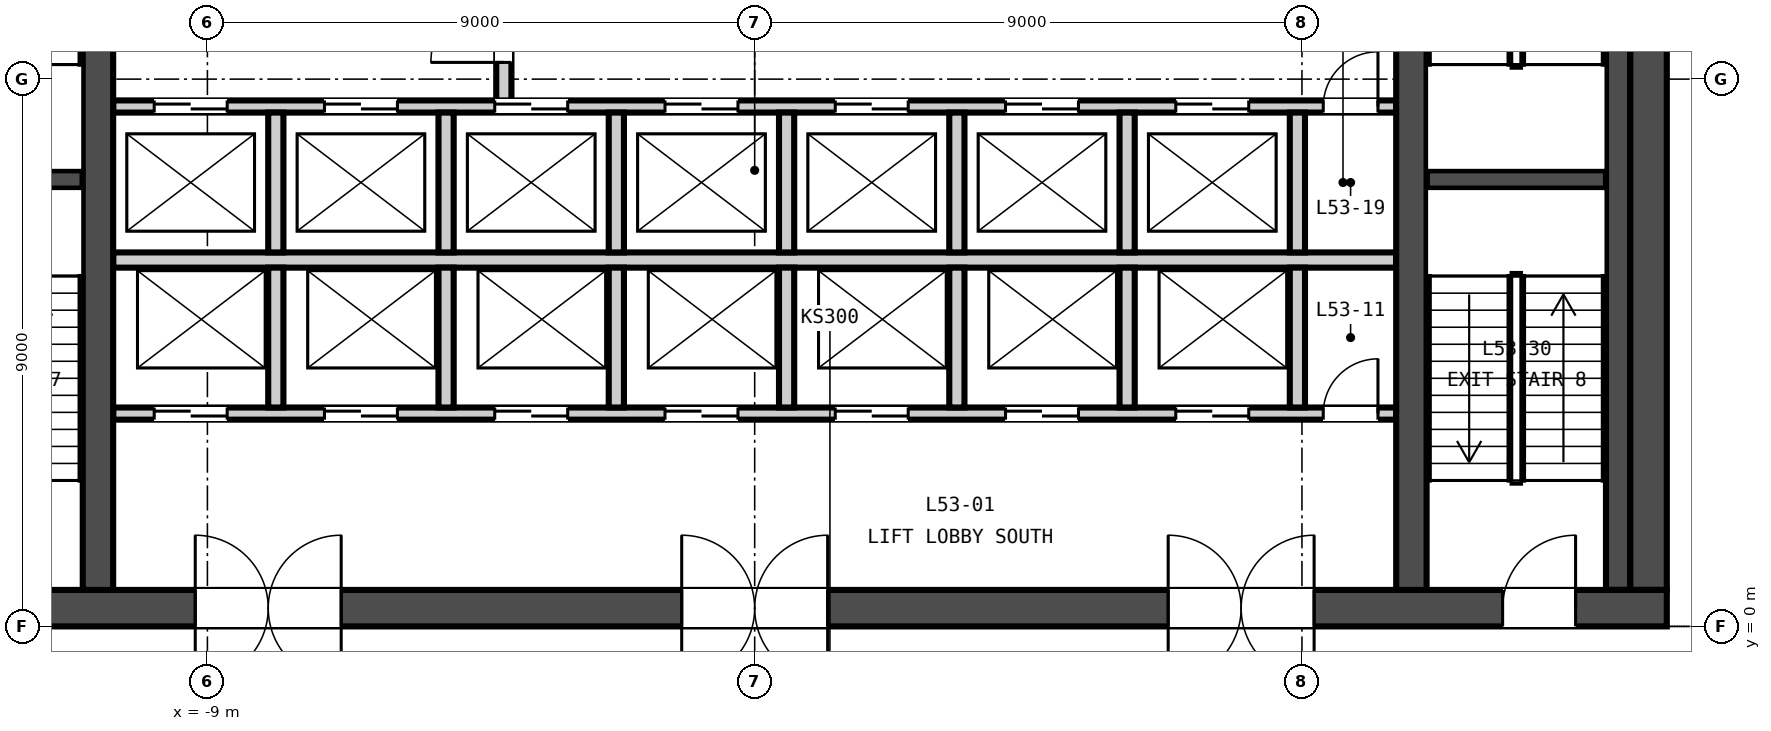
"""IFC4 building model, lengths in metres.
Left out: names, types, materials, properties, quantities, classifications, styles, units other than length and angle.
Written with IfcOpenShell. Run it as: python <this file> out.ifc"""

import sys

from ifc_helpers import new_model, si_unit, direction, frame, frame_2d, origin, place, context, subcontext, project, spatial, rectangle, extrude, element, fill, save


model = new_model("IFC4")
c1 = context("Model", 3, precision=1e-05, world=origin(), true_north=direction((0.0, 1.0)))
c2 = subcontext(c1, "Body", "Model", "MODEL_VIEW")
j1 = project(units=[si_unit("LENGTHUNIT", "METRE"), si_unit("PLANEANGLEUNIT", "RADIAN")], contexts=[c1])
p1 = place(None, origin())
s1 = spatial("IfcSite", under=j1, at=p1, CompositionType="ELEMENT")
p2 = place(p1, origin())
s2 = spatial("IfcBuilding", under=s1, at=p2, CompositionType="ELEMENT")
p3 = place(p2, frame((0.0, 0.0, 211.8)))
s3 = spatial("IfcBuildingStorey", under=s2, at=p3, CompositionType="ELEMENT", Elevation=211.8)
p4 = place(p3, frame((-15.0, 0.3, -0.3), z_axis=(0.0, 0.0, 1.0), x_axis=(1.0, 0.0, 0.0)))
e1 = element("IfcWall", 1, at=p4, inside=s3, PredefinedType="SOLIDWALL", context=c2, shape_type="SweptSolid", body=[
    extrude(rectangle(XDim=30.0, YDim=0.6, at=frame_2d((15.0, 0.0))), origin(), (0.0, 0.0, 1.0), 4.65),
])
p5 = place(p4, frame((5.8, 0.0, 0.3)))
e2 = element("IfcOpeningElement", 2, at=p5, cuts=e1, PredefinedType="OPENING", context=c2, shape_type="SweptSolid", body=[
    extrude(rectangle(XDim=2.4, YDim=2.4, at=frame_2d((1.2, 1.2))), frame((0.0, 0.31, 0.0), z_axis=(0.0, -1.0, 0.0), x_axis=(1.0, 0.0, 0.0)), (0.0, 0.0, 1.0), 0.62),
])
p6 = place(p4, frame((13.8, 0.0, 0.3)))
e3 = element("IfcOpeningElement", 3, at=p6, cuts=e1, PredefinedType="OPENING", context=c2, shape_type="SweptSolid", body=[
    extrude(rectangle(XDim=2.4, YDim=2.4, at=frame_2d((1.2, 1.2))), frame((0.0, 0.31, 0.0), z_axis=(0.0, -1.0, 0.0), x_axis=(1.0, 0.0, 0.0)), (0.0, 0.0, 1.0), 0.62),
])
p7 = place(p4, frame((21.8, 0.0, 0.3)))
e4 = element("IfcOpeningElement", 4, at=p7, cuts=e1, PredefinedType="OPENING", context=c2, shape_type="SweptSolid", body=[
    extrude(rectangle(XDim=2.4, YDim=2.4, at=frame_2d((1.2, 1.2))), frame((0.0, 0.31, 0.0), z_axis=(0.0, -1.0, 0.0), x_axis=(1.0, 0.0, 0.0)), (0.0, 0.0, 1.0), 0.62),
])
p8 = place(p4, frame((1.5, 0.0, 0.3)))
e5 = element("IfcOpeningElement", 5, at=p8, cuts=e1, PredefinedType="OPENING", context=c2, shape_type="SweptSolid", body=[
    extrude(rectangle(XDim=1.2, YDim=2.1, at=frame_2d((0.6, 1.05))), frame((0.0, 0.31, 0.0), z_axis=(0.0, -1.0, 0.0), x_axis=(1.0, 0.0, 0.0)), (0.0, 0.0, 1.0), 0.62),
])
p9 = place(p4, frame((27.3, 0.0, 0.3)))
e6 = element("IfcOpeningElement", 6, at=p9, cuts=e1, PredefinedType="OPENING", context=c2, shape_type="SweptSolid", body=[
    extrude(rectangle(XDim=1.2, YDim=2.1, at=frame_2d((0.6, 1.05))), frame((0.0, 0.31, 0.0), z_axis=(0.0, -1.0, 0.0), x_axis=(1.0, 0.0, 0.0)), (0.0, 0.0, 1.0), 0.62),
])
p10 = place(p3, frame((14.7, 0.6, -0.3), z_axis=(0.0, 0.0, 1.0), x_axis=(0.0, 1.0, 0.0)))
e7 = element("IfcWall", 7, at=p10, inside=s3, PredefinedType="SOLIDWALL", context=c2, shape_type="SweptSolid", body=[
    extrude(rectangle(XDim=13.8, YDim=0.6, at=frame_2d((6.9, 0.0))), origin(), (0.0, 0.0, 1.0), 4.65),
])
for number, where, z_axis, x_axis in (
    (8, (-10.8, 0.6, -0.3), (0.0, 0.0, 1.0), (0.0, 1.0, 0.0)),
    (9, (10.8, 0.6, -0.3), (0.0, 0.0, 1.0), (0.0, 1.0, 0.0)),
):
    element("IfcWall", number, at=place(p3, frame(where, z_axis=z_axis, x_axis=x_axis)), inside=s3, PredefinedType="SOLIDWALL", context=c2, shape_type="SweptSolid", body=[
        extrude(rectangle(XDim=13.8, YDim=0.5, at=frame_2d((6.9, 0.0))), origin(), (0.0, 0.0, 1.0), 4.65),
    ])
p11 = place(p3, frame((-10.55, 3.5, 0.0), z_axis=(0.0, 0.0, 1.0), x_axis=(1.0, 0.0, 0.0)))
e10 = element("IfcWall", 10, at=p11, inside=s3, PredefinedType="PARTITIONING", context=c2, shape_type="SweptSolid", body=[
    extrude(rectangle(XDim=21.1, YDim=0.2, at=frame_2d((10.55, 0.0))), origin(), (0.0, 0.0, 1.0), 4.35),
])
p12 = place(p11, frame((0.675, 0.0, 0.0)))
e11 = element("IfcOpeningElement", 11, at=p12, cuts=e10, PredefinedType="OPENING", context=c2, shape_type="SweptSolid", body=[
    extrude(rectangle(XDim=1.2, YDim=2.1, at=frame_2d((0.6, 1.05))), frame((0.0, 0.11, 0.0), z_axis=(0.0, -1.0, 0.0), x_axis=(1.0, 0.0, 0.0)), (0.0, 0.0, 1.0), 0.22),
])
p13 = place(p11, frame((3.475, 0.0, 0.0)))
e12 = element("IfcOpeningElement", 12, at=p13, cuts=e10, PredefinedType="OPENING", context=c2, shape_type="SweptSolid", body=[
    extrude(rectangle(XDim=1.2, YDim=2.1, at=frame_2d((0.6, 1.05))), frame((0.0, 0.11, 0.0), z_axis=(0.0, -1.0, 0.0), x_axis=(1.0, 0.0, 0.0)), (0.0, 0.0, 1.0), 0.22),
])
p14 = place(p11, frame((6.275, 0.0, 0.0)))
e13 = element("IfcOpeningElement", 13, at=p14, cuts=e10, PredefinedType="OPENING", context=c2, shape_type="SweptSolid", body=[
    extrude(rectangle(XDim=1.2, YDim=2.1, at=frame_2d((0.6, 1.05))), frame((0.0, 0.11, 0.0), z_axis=(0.0, -1.0, 0.0), x_axis=(1.0, 0.0, 0.0)), (0.0, 0.0, 1.0), 0.22),
])
p15 = place(p11, frame((9.075, 0.0, 0.0)))
e14 = element("IfcOpeningElement", 14, at=p15, cuts=e10, PredefinedType="OPENING", context=c2, shape_type="SweptSolid", body=[
    extrude(rectangle(XDim=1.2, YDim=2.1, at=frame_2d((0.6, 1.05))), frame((0.0, 0.11, 0.0), z_axis=(0.0, -1.0, 0.0), x_axis=(1.0, 0.0, 0.0)), (0.0, 0.0, 1.0), 0.22),
])
p16 = place(p11, frame((11.875, 0.0, 0.0)))
e15 = element("IfcOpeningElement", 15, at=p16, cuts=e10, PredefinedType="OPENING", context=c2, shape_type="SweptSolid", body=[
    extrude(rectangle(XDim=1.2, YDim=2.1, at=frame_2d((0.6, 1.05))), frame((0.0, 0.11, 0.0), z_axis=(0.0, -1.0, 0.0), x_axis=(1.0, 0.0, 0.0)), (0.0, 0.0, 1.0), 0.22),
])
p17 = place(p11, frame((14.675, 0.0, 0.0)))
e16 = element("IfcOpeningElement", 16, at=p17, cuts=e10, PredefinedType="OPENING", context=c2, shape_type="SweptSolid", body=[
    extrude(rectangle(XDim=1.2, YDim=2.1, at=frame_2d((0.6, 1.05))), frame((0.0, 0.11, 0.0), z_axis=(0.0, -1.0, 0.0), x_axis=(1.0, 0.0, 0.0)), (0.0, 0.0, 1.0), 0.22),
])
p18 = place(p11, frame((17.475, 0.0, 0.0)))
e17 = element("IfcOpeningElement", 17, at=p18, cuts=e10, PredefinedType="OPENING", context=c2, shape_type="SweptSolid", body=[
    extrude(rectangle(XDim=1.2, YDim=2.1, at=frame_2d((0.6, 1.05))), frame((0.0, 0.11, 0.0), z_axis=(0.0, -1.0, 0.0), x_axis=(1.0, 0.0, 0.0)), (0.0, 0.0, 1.0), 0.22),
])
p19 = place(p11, frame((19.9, 0.0, 0.0)))
e18 = element("IfcOpeningElement", 18, at=p19, cuts=e10, PredefinedType="OPENING", context=c2, shape_type="SweptSolid", body=[
    extrude(rectangle(XDim=0.9, YDim=2.1, at=frame_2d((0.45, 1.05))), frame((0.0, 0.11, 0.0), z_axis=(0.0, -1.0, 0.0), x_axis=(1.0, 0.0, 0.0)), (0.0, 0.0, 1.0), 0.22),
])
p20 = place(p3, frame((-10.55, 6.025, 0.0), z_axis=(0.0, 0.0, 1.0), x_axis=(1.0, 0.0, 0.0)))
e19 = element("IfcWall", 19, at=p20, inside=s3, PredefinedType="PARTITIONING", context=c2, shape_type="SweptSolid", body=[
    extrude(rectangle(XDim=21.1, YDim=0.25, at=frame_2d((10.55, 0.0))), origin(), (0.0, 0.0, 1.0), 4.35),
])
p21 = place(p3, frame((-10.55, 8.55, 0.0), z_axis=(0.0, 0.0, 1.0), x_axis=(1.0, 0.0, 0.0)))
e20 = element("IfcWall", 20, at=p21, inside=s3, PredefinedType="PARTITIONING", context=c2, shape_type="SweptSolid", body=[
    extrude(rectangle(XDim=21.1, YDim=0.2, at=frame_2d((10.55, 0.0))), origin(), (0.0, 0.0, 1.0), 4.35),
])
p22 = place(p21, frame((0.675, 0.0, 0.0)))
e21 = element("IfcOpeningElement", 21, at=p22, cuts=e20, PredefinedType="OPENING", context=c2, shape_type="SweptSolid", body=[
    extrude(rectangle(XDim=1.2, YDim=2.1, at=frame_2d((0.6, 1.05))), frame((0.0, 0.11, 0.0), z_axis=(0.0, -1.0, 0.0), x_axis=(1.0, 0.0, 0.0)), (0.0, 0.0, 1.0), 0.22),
])
p23 = place(p21, frame((3.475, 0.0, 0.0)))
e22 = element("IfcOpeningElement", 22, at=p23, cuts=e20, PredefinedType="OPENING", context=c2, shape_type="SweptSolid", body=[
    extrude(rectangle(XDim=1.2, YDim=2.1, at=frame_2d((0.6, 1.05))), frame((0.0, 0.11, 0.0), z_axis=(0.0, -1.0, 0.0), x_axis=(1.0, 0.0, 0.0)), (0.0, 0.0, 1.0), 0.22),
])
p24 = place(p21, frame((6.275, 0.0, 0.0)))
e23 = element("IfcOpeningElement", 23, at=p24, cuts=e20, PredefinedType="OPENING", context=c2, shape_type="SweptSolid", body=[
    extrude(rectangle(XDim=1.2, YDim=2.1, at=frame_2d((0.6, 1.05))), frame((0.0, 0.11, 0.0), z_axis=(0.0, -1.0, 0.0), x_axis=(1.0, 0.0, 0.0)), (0.0, 0.0, 1.0), 0.22),
])
p25 = place(p21, frame((9.075, 0.0, 0.0)))
e24 = element("IfcOpeningElement", 24, at=p25, cuts=e20, PredefinedType="OPENING", context=c2, shape_type="SweptSolid", body=[
    extrude(rectangle(XDim=1.2, YDim=2.1, at=frame_2d((0.6, 1.05))), frame((0.0, 0.11, 0.0), z_axis=(0.0, -1.0, 0.0), x_axis=(1.0, 0.0, 0.0)), (0.0, 0.0, 1.0), 0.22),
])
p26 = place(p21, frame((11.875, 0.0, 0.0)))
e25 = element("IfcOpeningElement", 25, at=p26, cuts=e20, PredefinedType="OPENING", context=c2, shape_type="SweptSolid", body=[
    extrude(rectangle(XDim=1.2, YDim=2.1, at=frame_2d((0.6, 1.05))), frame((0.0, 0.11, 0.0), z_axis=(0.0, -1.0, 0.0), x_axis=(1.0, 0.0, 0.0)), (0.0, 0.0, 1.0), 0.22),
])
p27 = place(p21, frame((14.675, 0.0, 0.0)))
e26 = element("IfcOpeningElement", 26, at=p27, cuts=e20, PredefinedType="OPENING", context=c2, shape_type="SweptSolid", body=[
    extrude(rectangle(XDim=1.2, YDim=2.1, at=frame_2d((0.6, 1.05))), frame((0.0, 0.11, 0.0), z_axis=(0.0, -1.0, 0.0), x_axis=(1.0, 0.0, 0.0)), (0.0, 0.0, 1.0), 0.22),
])
p28 = place(p21, frame((17.475, 0.0, 0.0)))
e27 = element("IfcOpeningElement", 27, at=p28, cuts=e20, PredefinedType="OPENING", context=c2, shape_type="SweptSolid", body=[
    extrude(rectangle(XDim=1.2, YDim=2.1, at=frame_2d((0.6, 1.05))), frame((0.0, 0.11, 0.0), z_axis=(0.0, -1.0, 0.0), x_axis=(1.0, 0.0, 0.0)), (0.0, 0.0, 1.0), 0.22),
])
p29 = place(p21, frame((19.9, 0.0, 0.0)))
e28 = element("IfcOpeningElement", 28, at=p29, cuts=e20, PredefinedType="OPENING", context=c2, shape_type="SweptSolid", body=[
    extrude(rectangle(XDim=0.9, YDim=2.1, at=frame_2d((0.45, 1.05))), frame((0.0, 0.11, 0.0), z_axis=(0.0, -1.0, 0.0), x_axis=(1.0, 0.0, 0.0)), (0.0, 0.0, 1.0), 0.22),
])
p30 = place(p3, frame((-4.125, 8.65, 0.0), z_axis=(0.0, 0.0, 1.0), x_axis=(0.0, 1.0, 0.0)))
e29 = element("IfcWall", 29, at=p30, inside=s3, PredefinedType="PARTITIONING", context=c2, shape_type="SweptSolid", body=[
    extrude(rectangle(XDim=2.45, YDim=0.25, at=frame_2d((1.225, 0.0))), origin(), (0.0, 0.0, 1.0), 4.35),
])
p31 = place(p30, frame((0.625, 0.0, 0.0)))
e30 = element("IfcOpeningElement", 30, at=p31, cuts=e29, PredefinedType="OPENING", context=c2, shape_type="SweptSolid", body=[
    extrude(rectangle(XDim=1.2, YDim=2.1, at=frame_2d((0.6, 1.05))), frame((0.0, 0.135, 0.0), z_axis=(0.0, -1.0, 0.0), x_axis=(1.0, 0.0, 0.0)), (0.0, 0.0, 1.0), 0.27),
])
for number, where, z_axis, x_axis in (
    (31, (-7.875, 3.6, 0.0), (0.0, 0.0, 1.0), (0.0, 1.0, 0.0)),
    (32, (-5.075, 3.6, 0.0), (0.0, 0.0, 1.0), (0.0, 1.0, 0.0)),
    (33, (-2.275, 3.6, 0.0), (0.0, 0.0, 1.0), (0.0, 1.0, 0.0)),
    (34, (0.525, 3.6, 0.0), (0.0, 0.0, 1.0), (0.0, 1.0, 0.0)),
    (35, (3.325, 3.6, 0.0), (0.0, 0.0, 1.0), (0.0, 1.0, 0.0)),
    (36, (6.125, 3.6, 0.0), (0.0, 0.0, 1.0), (0.0, 1.0, 0.0)),
    (37, (8.925, 3.6, 0.0), (0.0, 0.0, 1.0), (0.0, 1.0, 0.0)),
):
    element("IfcWall", number, at=place(p3, frame(where, z_axis=z_axis, x_axis=x_axis)), inside=s3, PredefinedType="PARTITIONING", context=c2, shape_type="SweptSolid", body=[
        extrude(rectangle(XDim=2.3, YDim=0.25, at=frame_2d((1.15, 0.0))), origin(), (0.0, 0.0, 1.0), 4.35),
    ])
for number, where, z_axis, x_axis in (
    (38, (-7.875, 6.15, 0.0), (0.0, 0.0, 1.0), (0.0, 1.0, 0.0)),
    (39, (-5.075, 6.15, 0.0), (0.0, 0.0, 1.0), (0.0, 1.0, 0.0)),
    (40, (-2.275, 6.15, 0.0), (0.0, 0.0, 1.0), (0.0, 1.0, 0.0)),
    (41, (0.525, 6.15, 0.0), (0.0, 0.0, 1.0), (0.0, 1.0, 0.0)),
    (42, (3.325, 6.15, 0.0), (0.0, 0.0, 1.0), (0.0, 1.0, 0.0)),
    (43, (6.125, 6.15, 0.0), (0.0, 0.0, 1.0), (0.0, 1.0, 0.0)),
    (44, (8.925, 6.15, 0.0), (0.0, 0.0, 1.0), (0.0, 1.0, 0.0)),
):
    element("IfcWall", number, at=place(p3, frame(where, z_axis=z_axis, x_axis=x_axis)), inside=s3, PredefinedType="PARTITIONING", context=c2, shape_type="SweptSolid", body=[
        extrude(rectangle(XDim=2.3, YDim=0.25, at=frame_2d((1.15, 0.0))), origin(), (0.0, 0.0, 1.0), 4.35),
    ])
for number, where, z_axis, x_axis in (
    (45, (-14.0, 7.35, 0.0), (0.0, 0.0, 1.0), (1.0, 0.0, 0.0)),
    (46, (11.05, 7.35, 0.0), (0.0, 0.0, 1.0), (1.0, 0.0, 0.0)),
):
    element("IfcWall", number, at=place(p3, frame(where, z_axis=z_axis, x_axis=x_axis)), inside=s3, PredefinedType="SOLIDWALL", context=c2, shape_type="SweptSolid", body=[
        extrude(rectangle(XDim=2.95, YDim=0.3, at=frame_2d((1.475, 0.0))), origin(), (0.0, 0.0, 1.0), 4.35),
    ])
p32 = place(p3, frame((14.2, 0.6, 0.0), z_axis=(0.0, 0.0, 1.0), x_axis=(0.0, 1.0, 0.0)))
e47 = element("IfcWall", 47, at=p32, inside=s3, PredefinedType="SOLIDWALL", context=c2, shape_type="SweptSolid", body=[
    extrude(rectangle(XDim=13.8, YDim=0.4, at=frame_2d((6.9, 0.0))), origin(), (0.0, 0.0, 1.0), 4.35),
])
p33 = place(p31, origin())
e48 = element("IfcDoor", 48, at=p33, inside=s3, OperationType="SINGLE_SWING_LEFT", PredefinedType="DOOR", context=c2, shape_type="SweptSolid", body=[
    extrude(rectangle(XDim=1.2, YDim=2.1, at=frame_2d((0.6, 1.05))), frame((0.0, 0.025, 0.0), z_axis=(0.0, -1.0, 0.0), x_axis=(1.0, 0.0, 0.0)), (0.0, 0.0, 1.0), 0.05),
])
fill(e30, e48)
p34 = place(p12, origin())
e49 = element("IfcDoor", 49, at=p34, inside=s3, OperationType="DOUBLE_DOOR_SLIDING", PredefinedType="DOOR", context=c2, shape_type="SweptSolid", body=[
    extrude(rectangle(XDim=1.2, YDim=2.1, at=frame_2d((0.6, 1.05))), frame((0.0, 0.025, 0.0), z_axis=(0.0, -1.0, 0.0), x_axis=(1.0, 0.0, 0.0)), (0.0, 0.0, 1.0), 0.05),
])
fill(e11, e49)
p35 = place(p13, origin())
e50 = element("IfcDoor", 50, at=p35, inside=s3, OperationType="DOUBLE_DOOR_SLIDING", PredefinedType="DOOR", context=c2, shape_type="SweptSolid", body=[
    extrude(rectangle(XDim=1.2, YDim=2.1, at=frame_2d((0.6, 1.05))), frame((0.0, 0.025, 0.0), z_axis=(0.0, -1.0, 0.0), x_axis=(1.0, 0.0, 0.0)), (0.0, 0.0, 1.0), 0.05),
])
fill(e12, e50)
p36 = place(p14, origin())
e51 = element("IfcDoor", 51, at=p36, inside=s3, OperationType="DOUBLE_DOOR_SLIDING", PredefinedType="DOOR", context=c2, shape_type="SweptSolid", body=[
    extrude(rectangle(XDim=1.2, YDim=2.1, at=frame_2d((0.6, 1.05))), frame((0.0, 0.025, 0.0), z_axis=(0.0, -1.0, 0.0), x_axis=(1.0, 0.0, 0.0)), (0.0, 0.0, 1.0), 0.05),
])
fill(e13, e51)
p37 = place(p15, origin())
e52 = element("IfcDoor", 52, at=p37, inside=s3, OperationType="DOUBLE_DOOR_SLIDING", PredefinedType="DOOR", context=c2, shape_type="SweptSolid", body=[
    extrude(rectangle(XDim=1.2, YDim=2.1, at=frame_2d((0.6, 1.05))), frame((0.0, 0.025, 0.0), z_axis=(0.0, -1.0, 0.0), x_axis=(1.0, 0.0, 0.0)), (0.0, 0.0, 1.0), 0.05),
])
fill(e14, e52)
p38 = place(p16, origin())
e53 = element("IfcDoor", 53, at=p38, inside=s3, OperationType="DOUBLE_DOOR_SLIDING", PredefinedType="DOOR", context=c2, shape_type="SweptSolid", body=[
    extrude(rectangle(XDim=1.2, YDim=2.1, at=frame_2d((0.6, 1.05))), frame((0.0, 0.025, 0.0), z_axis=(0.0, -1.0, 0.0), x_axis=(1.0, 0.0, 0.0)), (0.0, 0.0, 1.0), 0.05),
])
fill(e15, e53)
p39 = place(p17, origin())
e54 = element("IfcDoor", 54, at=p39, inside=s3, OperationType="DOUBLE_DOOR_SLIDING", PredefinedType="DOOR", context=c2, shape_type="SweptSolid", body=[
    extrude(rectangle(XDim=1.2, YDim=2.1, at=frame_2d((0.6, 1.05))), frame((0.0, 0.025, 0.0), z_axis=(0.0, -1.0, 0.0), x_axis=(1.0, 0.0, 0.0)), (0.0, 0.0, 1.0), 0.05),
])
fill(e16, e54)
p40 = place(p18, origin())
e55 = element("IfcDoor", 55, at=p40, inside=s3, OperationType="DOUBLE_DOOR_SLIDING", PredefinedType="DOOR", context=c2, shape_type="SweptSolid", body=[
    extrude(rectangle(XDim=1.2, YDim=2.1, at=frame_2d((0.6, 1.05))), frame((0.0, 0.025, 0.0), z_axis=(0.0, -1.0, 0.0), x_axis=(1.0, 0.0, 0.0)), (0.0, 0.0, 1.0), 0.05),
])
fill(e17, e55)
p41 = place(p19, origin())
e56 = element("IfcDoor", 56, at=p41, inside=s3, OperationType="SINGLE_SWING_RIGHT", PredefinedType="DOOR", context=c2, shape_type="SweptSolid", body=[
    extrude(rectangle(XDim=0.9, YDim=2.1, at=frame_2d((0.45, 1.05))), frame((0.0, 0.025, 0.0), z_axis=(0.0, -1.0, 0.0), x_axis=(1.0, 0.0, 0.0)), (0.0, 0.0, 1.0), 0.05),
])
fill(e18, e56)
p42 = place(p22, origin())
e57 = element("IfcDoor", 57, at=p42, inside=s3, OperationType="DOUBLE_DOOR_SLIDING", PredefinedType="DOOR", context=c2, shape_type="SweptSolid", body=[
    extrude(rectangle(XDim=1.2, YDim=2.1, at=frame_2d((0.6, 1.05))), frame((0.0, 0.025, 0.0), z_axis=(0.0, -1.0, 0.0), x_axis=(1.0, 0.0, 0.0)), (0.0, 0.0, 1.0), 0.05),
])
fill(e21, e57)
p43 = place(p23, origin())
e58 = element("IfcDoor", 58, at=p43, inside=s3, OperationType="DOUBLE_DOOR_SLIDING", PredefinedType="DOOR", context=c2, shape_type="SweptSolid", body=[
    extrude(rectangle(XDim=1.2, YDim=2.1, at=frame_2d((0.6, 1.05))), frame((0.0, 0.025, 0.0), z_axis=(0.0, -1.0, 0.0), x_axis=(1.0, 0.0, 0.0)), (0.0, 0.0, 1.0), 0.05),
])
fill(e22, e58)
p44 = place(p24, origin())
e59 = element("IfcDoor", 59, at=p44, inside=s3, OperationType="DOUBLE_DOOR_SLIDING", PredefinedType="DOOR", context=c2, shape_type="SweptSolid", body=[
    extrude(rectangle(XDim=1.2, YDim=2.1, at=frame_2d((0.6, 1.05))), frame((0.0, 0.025, 0.0), z_axis=(0.0, -1.0, 0.0), x_axis=(1.0, 0.0, 0.0)), (0.0, 0.0, 1.0), 0.05),
])
fill(e23, e59)
p45 = place(p25, origin())
e60 = element("IfcDoor", 60, at=p45, inside=s3, OperationType="DOUBLE_DOOR_SLIDING", PredefinedType="DOOR", context=c2, shape_type="SweptSolid", body=[
    extrude(rectangle(XDim=1.2, YDim=2.1, at=frame_2d((0.6, 1.05))), frame((0.0, 0.025, 0.0), z_axis=(0.0, -1.0, 0.0), x_axis=(1.0, 0.0, 0.0)), (0.0, 0.0, 1.0), 0.05),
])
fill(e24, e60)
p46 = place(p26, origin())
e61 = element("IfcDoor", 61, at=p46, inside=s3, OperationType="DOUBLE_DOOR_SLIDING", PredefinedType="DOOR", context=c2, shape_type="SweptSolid", body=[
    extrude(rectangle(XDim=1.2, YDim=2.1, at=frame_2d((0.6, 1.05))), frame((0.0, 0.025, 0.0), z_axis=(0.0, -1.0, 0.0), x_axis=(1.0, 0.0, 0.0)), (0.0, 0.0, 1.0), 0.05),
])
fill(e25, e61)
p47 = place(p27, origin())
e62 = element("IfcDoor", 62, at=p47, inside=s3, OperationType="DOUBLE_DOOR_SLIDING", PredefinedType="DOOR", context=c2, shape_type="SweptSolid", body=[
    extrude(rectangle(XDim=1.2, YDim=2.1, at=frame_2d((0.6, 1.05))), frame((0.0, 0.025, 0.0), z_axis=(0.0, -1.0, 0.0), x_axis=(1.0, 0.0, 0.0)), (0.0, 0.0, 1.0), 0.05),
])
fill(e26, e62)
p48 = place(p28, origin())
e63 = element("IfcDoor", 63, at=p48, inside=s3, OperationType="DOUBLE_DOOR_SLIDING", PredefinedType="DOOR", context=c2, shape_type="SweptSolid", body=[
    extrude(rectangle(XDim=1.2, YDim=2.1, at=frame_2d((0.6, 1.05))), frame((0.0, 0.025, 0.0), z_axis=(0.0, -1.0, 0.0), x_axis=(1.0, 0.0, 0.0)), (0.0, 0.0, 1.0), 0.05),
])
fill(e27, e63)
p49 = place(p29, origin())
e64 = element("IfcDoor", 64, at=p49, inside=s3, OperationType="SINGLE_SWING_RIGHT", PredefinedType="DOOR", context=c2, shape_type="SweptSolid", body=[
    extrude(rectangle(XDim=0.9, YDim=2.1, at=frame_2d((0.45, 1.05))), frame((0.0, 0.025, 0.0), z_axis=(0.0, -1.0, 0.0), x_axis=(1.0, 0.0, 0.0)), (0.0, 0.0, 1.0), 0.05),
])
fill(e28, e64)
p50 = place(p5, origin())
e65 = element("IfcDoor", 65, at=p50, inside=s3, OperationType="DOUBLE_DOOR_DOUBLE_SWING", PredefinedType="DOOR", context=c2, shape_type="SweptSolid", body=[
    extrude(rectangle(XDim=2.4, YDim=2.4, at=frame_2d((1.2, 1.2))), frame((0.0, 0.025, 0.0), z_axis=(0.0, -1.0, 0.0), x_axis=(1.0, 0.0, 0.0)), (0.0, 0.0, 1.0), 0.05),
])
fill(e2, e65)
p51 = place(p6, origin())
e66 = element("IfcDoor", 66, at=p51, inside=s3, OperationType="DOUBLE_DOOR_DOUBLE_SWING", PredefinedType="DOOR", context=c2, shape_type="SweptSolid", body=[
    extrude(rectangle(XDim=2.4, YDim=2.4, at=frame_2d((1.2, 1.2))), frame((0.0, 0.025, 0.0), z_axis=(0.0, -1.0, 0.0), x_axis=(1.0, 0.0, 0.0)), (0.0, 0.0, 1.0), 0.05),
])
fill(e3, e66)
p52 = place(p7, origin())
e67 = element("IfcDoor", 67, at=p52, inside=s3, OperationType="DOUBLE_DOOR_DOUBLE_SWING", PredefinedType="DOOR", context=c2, shape_type="SweptSolid", body=[
    extrude(rectangle(XDim=2.4, YDim=2.4, at=frame_2d((1.2, 1.2))), frame((0.0, 0.025, 0.0), z_axis=(0.0, -1.0, 0.0), x_axis=(1.0, 0.0, 0.0)), (0.0, 0.0, 1.0), 0.05),
])
fill(e4, e67)
p53 = place(p9, origin())
e68 = element("IfcDoor", 68, at=p53, inside=s3, OperationType="SINGLE_SWING_RIGHT", PredefinedType="DOOR", context=c2, shape_type="SweptSolid", body=[
    extrude(rectangle(XDim=1.2, YDim=2.1, at=frame_2d((0.6, 1.05))), frame((0.0, 0.025, 0.0), z_axis=(0.0, -1.0, 0.0), x_axis=(1.0, 0.0, 0.0)), (0.0, 0.0, 1.0), 0.05),
])
fill(e6, e68)
save(model, sys.argv[1])
